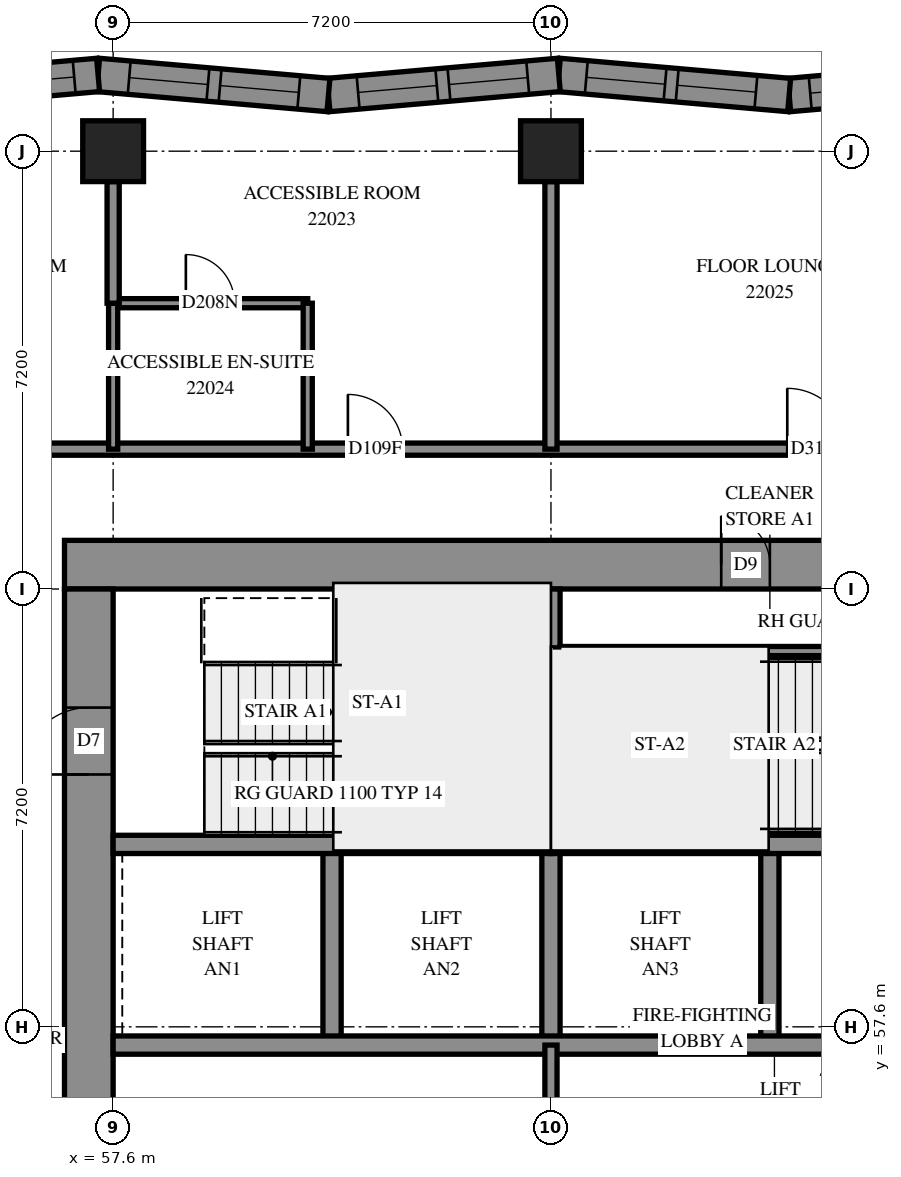
"""IFC4 building model, lengths in metres.
Left out: names, types, materials, properties, quantities, classifications, styles, units other than length and angle.
Written with IfcOpenShell. Run it as: python <this file> out.ifc"""

import sys

from ifc_helpers import new_model, si_unit, direction, frame, frame_2d, origin, origin_2d, place, context, subcontext, project, spatial, polyline, rectangle, outline, extrude, element, fill, save


model = new_model("IFC4")
c1 = context("Model", 3, precision=1e-05, world=origin(), true_north=direction((0.0, 1.0)))
c2 = subcontext(c1, "Body", "Model", "MODEL_VIEW")
j1 = project(units=[si_unit("LENGTHUNIT", "METRE"), si_unit("PLANEANGLEUNIT", "RADIAN")], contexts=[c1])
p1 = place(None, origin())
s1 = spatial("IfcSite", under=j1, at=p1, CompositionType="ELEMENT")
p2 = place(p1, origin())
s2 = spatial("IfcBuilding", under=s1, at=p2, CompositionType="ELEMENT")
p3 = place(p2, frame((0.0, 0.0, 84.6)))
s3 = spatial("IfcBuildingStorey", under=s2, at=p3, CompositionType="ELEMENT", Elevation=84.6)
for number, where, z_axis, x_axis in (
    (1, (57.6, 72.0, 0.0), (0.0, 0.0, 1.0), (1.0, 0.0, 0.0)),
    (2, (64.8, 72.0, 0.0), (0.0, 0.0, 1.0), (1.0, 0.0, 0.0)),
):
    element("IfcColumn", number, at=place(p3, frame(where, z_axis=z_axis, x_axis=x_axis)), inside=s3, PredefinedType="COLUMN", context=c2, shape_type="SweptSolid", body=[
        extrude(rectangle(XDim=1.0, YDim=1.0, at=origin_2d()), origin(), (0.0, 0.0, 1.0), 3.1),
    ])
p4 = place(p3, frame((56.8, 65.2, -0.3), z_axis=(0.0, 0.0, 1.0), x_axis=(1.0, 0.0, 0.0)))
e3 = element("IfcWall", 3, at=p4, inside=s3, PredefinedType="SHEAR", context=c2, shape_type="SweptSolid", body=[
    extrude(rectangle(XDim=16.0, YDim=0.8, at=frame_2d((8.0, 0.0))), origin(), (0.0, 0.0, 1.0), 2.7),
])
p5 = place(p4, frame((10.8, 0.0, 0.3)))
e4 = element("IfcOpeningElement", 4, at=p5, cuts=e3, PredefinedType="OPENING", context=c2, shape_type="SweptSolid", body=[
    extrude(rectangle(XDim=0.8, YDim=2.1, at=frame_2d((0.4, 1.05))), frame((0.0, 0.41, 0.0), z_axis=(0.0, -1.0, 0.0), x_axis=(1.0, 0.0, 0.0)), (0.0, 0.0, 1.0), 0.82),
])
p6 = place(p3, frame((57.2, 50.4, -0.3), z_axis=(0.0, 0.0, 1.0), x_axis=(0.0, 1.0, 0.0)))
e5 = element("IfcWall", 5, at=p6, inside=s3, PredefinedType="SHEAR", context=c2, shape_type="SweptSolid", body=[
    extrude(rectangle(XDim=14.4, YDim=0.8, at=frame_2d((7.2, 0.0))), origin(), (0.0, 0.0, 1.0), 2.7),
])
p7 = place(p6, frame((4.55, 0.0, 0.3)))
e6 = element("IfcOpeningElement", 6, at=p7, cuts=e5, PredefinedType="OPENING", context=c2, shape_type="SweptSolid", body=[
    extrude(rectangle(XDim=1.1, YDim=2.1, at=frame_2d((0.55, 1.05))), frame((0.0, 0.41, 0.0), z_axis=(0.0, -1.0, 0.0), x_axis=(1.0, 0.0, 0.0)), (0.0, 0.0, 1.0), 0.82),
])
p8 = place(p6, frame((11.35, 0.0, 0.3)))
e7 = element("IfcOpeningElement", 7, at=p8, cuts=e5, PredefinedType="OPENING", context=c2, shape_type="SweptSolid", body=[
    extrude(rectangle(XDim=1.1, YDim=2.1, at=frame_2d((0.55, 1.05))), frame((0.0, 0.41, 0.0), z_axis=(0.0, -1.0, 0.0), x_axis=(1.0, 0.0, 0.0)), (0.0, 0.0, 1.0), 0.82),
])
for number, where, z_axis, x_axis in (
    (8, (61.2, 57.3, 0.0), (0.0, 0.0, 1.0), (0.0, 1.0, 0.0)),
    (9, (64.8, 57.3, 0.0), (0.0, 0.0, 1.0), (0.0, 1.0, 0.0)),
    (10, (68.4, 57.3, 0.0), (0.0, 0.0, 1.0), (0.0, 1.0, 0.0)),
):
    element("IfcWall", number, at=place(p3, frame(where, z_axis=z_axis, x_axis=x_axis)), inside=s3, PredefinedType="SOLIDWALL", context=c2, shape_type="SweptSolid", body=[
        extrude(rectangle(XDim=3.3, YDim=0.3, at=frame_2d((1.65, 0.0))), origin(), (0.0, 0.0, 1.0), 3.1),
    ])
p9 = place(p3, frame((57.6, 57.3, 0.0), z_axis=(0.0, 0.0, 1.0), x_axis=(1.0, 0.0, 0.0)))
e11 = element("IfcWall", 11, at=p9, inside=s3, PredefinedType="SOLIDWALL", context=c2, shape_type="SweptSolid", body=[
    extrude(rectangle(XDim=14.4, YDim=0.3, at=frame_2d((7.2, 0.0))), origin(), (0.0, 0.0, 1.0), 3.1),
])
p10 = place(p9, frame((12.05, 0.0, 0.0)))
e12 = element("IfcOpeningElement", 12, at=p10, cuts=e11, PredefinedType="OPENING", context=c2, shape_type="SweptSolid", body=[
    extrude(rectangle(XDim=1.1, YDim=2.1, at=frame_2d((0.55, 1.05))), frame((0.0, 0.16, 0.0), z_axis=(0.0, -1.0, 0.0), x_axis=(1.0, 0.0, 0.0)), (0.0, 0.0, 1.0), 0.32),
])
for number, where, z_axis, x_axis in (
    (13, (57.6, 60.6, 0.0), (0.0, 0.0, 1.0), (1.0, 0.0, 0.0)),
    (14, (64.8, 60.6, 0.0), (0.0, 0.0, 1.0), (1.0, 0.0, 0.0)),
):
    element("IfcWall", number, at=place(p3, frame(where, z_axis=z_axis, x_axis=x_axis)), inside=s3, PredefinedType="SOLIDWALL", context=c2, shape_type="SweptSolid", body=[
        extrude(rectangle(XDim=7.2, YDim=0.3, at=frame_2d((3.6, 0.0))), origin(), (0.0, 0.0, 1.0), 3.1),
    ])
p11 = place(p3, frame((64.8, 60.6, 0.0), z_axis=(0.0, 0.0, 1.0), x_axis=(0.0, 1.0, 0.0)))
e15 = element("IfcWall", 15, at=p11, inside=s3, PredefinedType="SOLIDWALL", context=c2, shape_type="SweptSolid", body=[
    extrude(rectangle(XDim=4.2, YDim=0.3, at=frame_2d((2.1, 0.0))), origin(), (0.0, 0.0, 1.0), 3.1),
])
p12 = place(p3, frame((72.506, 73.254, 0.0), z_axis=(0.0, 0.0, 1.0), x_axis=(-0.9962273538, -0.0867816769, 0.0)))
e16 = element("IfcWall", 16, at=p12, inside=s3, PredefinedType="SOLIDWALL", context=c2, shape_type="SweptSolid", body=[
    extrude(outline(polyline([(-0.024, -0.275), (3.779, -0.275), (3.827, 0.275), (0.024, 0.275), (-0.024, -0.275)])), origin(), (0.0, 0.0, 1.0), 3.1),
])
p13 = place(p12, frame((0.655, 0.0, 0.5)))
e17 = element("IfcOpeningElement", 17, at=p13, cuts=e16, PredefinedType="OPENING", context=c2, shape_type="SweptSolid", body=[
    extrude(rectangle(XDim=1.3, YDim=2.45, at=frame_2d((0.65, 1.225))), frame((0.0, 0.285, 0.0), z_axis=(0.0, -1.0, 0.0), x_axis=(1.0, 0.0, 0.0)), (0.0, 0.0, 1.0), 0.57),
])
p14 = place(p12, frame((2.155, 0.0, 0.5)))
e18 = element("IfcOpeningElement", 18, at=p14, cuts=e16, PredefinedType="OPENING", context=c2, shape_type="SweptSolid", body=[
    extrude(rectangle(XDim=1.3, YDim=2.45, at=frame_2d((0.65, 1.225))), frame((0.0, 0.285, 0.0), z_axis=(0.0, -1.0, 0.0), x_axis=(1.0, 0.0, 0.0)), (0.0, 0.0, 1.0), 0.57),
])
p15 = place(p3, frame((68.718, 72.924, 0.0), z_axis=(0.0, 0.0, 1.0), x_axis=(-0.9962273538, 0.0867816769, 0.0)))
e19 = element("IfcWall", 19, at=p15, inside=s3, PredefinedType="SOLIDWALL", context=c2, shape_type="SweptSolid", body=[
    extrude(outline(polyline([(0.024, -0.275), (3.827, -0.275), (3.779, 0.275), (-0.024, 0.275), (0.024, -0.275)])), origin(), (0.0, 0.0, 1.0), 3.1),
])
p16 = place(p15, frame((0.549, 0.0, 0.5)))
e20 = element("IfcOpeningElement", 20, at=p16, cuts=e19, PredefinedType="OPENING", context=c2, shape_type="SweptSolid", body=[
    extrude(rectangle(XDim=1.3, YDim=2.45, at=frame_2d((0.65, 1.225))), frame((0.0, 0.285, 0.0), z_axis=(0.0, -1.0, 0.0), x_axis=(1.0, 0.0, 0.0)), (0.0, 0.0, 1.0), 0.57),
])
p17 = place(p15, frame((2.049, 0.0, 0.5)))
e21 = element("IfcOpeningElement", 21, at=p17, cuts=e19, PredefinedType="OPENING", context=c2, shape_type="SweptSolid", body=[
    extrude(rectangle(XDim=1.3, YDim=2.45, at=frame_2d((0.65, 1.225))), frame((0.0, 0.285, 0.0), z_axis=(0.0, -1.0, 0.0), x_axis=(1.0, 0.0, 0.0)), (0.0, 0.0, 1.0), 0.57),
])
p18 = place(p3, frame((64.929, 73.254, 0.0), z_axis=(0.0, 0.0, 1.0), x_axis=(-0.9962271558, -0.0867839505, 0.0)))
e22 = element("IfcWall", 22, at=p18, inside=s3, PredefinedType="SOLIDWALL", context=c2, shape_type="SweptSolid", body=[
    extrude(outline(polyline([(-0.024, -0.275), (3.779, -0.275), (3.827, 0.275), (0.024, 0.275), (-0.024, -0.275)])), origin(), (0.0, 0.0, 1.0), 3.1),
])
p19 = place(p18, frame((0.513, 0.0, 0.5)))
e23 = element("IfcOpeningElement", 23, at=p19, cuts=e22, PredefinedType="OPENING", context=c2, shape_type="SweptSolid", body=[
    extrude(rectangle(XDim=1.3, YDim=2.45, at=frame_2d((0.65, 1.225))), frame((0.0, 0.285, 0.0), z_axis=(0.0, -1.0, 0.0), x_axis=(1.0, 0.0, 0.0)), (0.0, 0.0, 1.0), 0.57),
])
p20 = place(p18, frame((2.013, 0.0, 0.5)))
e24 = element("IfcOpeningElement", 24, at=p20, cuts=e22, PredefinedType="OPENING", context=c2, shape_type="SweptSolid", body=[
    extrude(rectangle(XDim=1.3, YDim=2.45, at=frame_2d((0.65, 1.225))), frame((0.0, 0.285, 0.0), z_axis=(0.0, -1.0, 0.0), x_axis=(1.0, 0.0, 0.0)), (0.0, 0.0, 1.0), 0.57),
])
p21 = place(p3, frame((61.141, 72.924, 0.0), z_axis=(0.0, 0.0, 1.0), x_axis=(-0.9962273538, 0.0867816769, 0.0)))
e25 = element("IfcWall", 25, at=p21, inside=s3, PredefinedType="SOLIDWALL", context=c2, shape_type="SweptSolid", body=[
    extrude(outline(polyline([(0.024, -0.275), (3.827, -0.275), (3.779, 0.275), (-0.024, 0.275), (0.024, -0.275)])), origin(), (0.0, 0.0, 1.0), 3.1),
])
p22 = place(p21, frame((0.489, 0.0, 0.5)))
e26 = element("IfcOpeningElement", 26, at=p22, cuts=e25, PredefinedType="OPENING", context=c2, shape_type="SweptSolid", body=[
    extrude(rectangle(XDim=1.3, YDim=2.45, at=frame_2d((0.65, 1.225))), frame((0.0, 0.285, 0.0), z_axis=(0.0, -1.0, 0.0), x_axis=(1.0, 0.0, 0.0)), (0.0, 0.0, 1.0), 0.57),
])
p23 = place(p21, frame((1.989, 0.0, 0.5)))
e27 = element("IfcOpeningElement", 27, at=p23, cuts=e25, PredefinedType="OPENING", context=c2, shape_type="SweptSolid", body=[
    extrude(rectangle(XDim=1.3, YDim=2.45, at=frame_2d((0.65, 1.225))), frame((0.0, 0.285, 0.0), z_axis=(0.0, -1.0, 0.0), x_axis=(1.0, 0.0, 0.0)), (0.0, 0.0, 1.0), 0.57),
])
p24 = place(p3, frame((57.353, 73.254, 0.0), z_axis=(0.0, 0.0, 1.0), x_axis=(-0.9962273538, -0.0867816769, 0.0)))
e28 = element("IfcWall", 28, at=p24, inside=s3, PredefinedType="SOLIDWALL", context=c2, shape_type="SweptSolid", body=[
    extrude(outline(polyline([(-0.024, -0.275), (3.779, -0.275), (3.827, 0.275), (0.024, 0.275), (-0.024, -0.275)])), origin(), (0.0, 0.0, 1.0), 3.1),
])
p25 = place(p24, frame((0.395, 0.0, 0.5)))
e29 = element("IfcOpeningElement", 29, at=p25, cuts=e28, PredefinedType="OPENING", context=c2, shape_type="SweptSolid", body=[
    extrude(rectangle(XDim=1.3, YDim=2.45, at=frame_2d((0.65, 1.225))), frame((0.0, 0.285, 0.0), z_axis=(0.0, -1.0, 0.0), x_axis=(1.0, 0.0, 0.0)), (0.0, 0.0, 1.0), 0.57),
])
p26 = place(p24, frame((1.895, 0.0, 0.5)))
e30 = element("IfcOpeningElement", 30, at=p26, cuts=e28, PredefinedType="OPENING", context=c2, shape_type="SweptSolid", body=[
    extrude(rectangle(XDim=1.3, YDim=2.45, at=frame_2d((0.65, 1.225))), frame((0.0, 0.285, 0.0), z_axis=(0.0, -1.0, 0.0), x_axis=(1.0, 0.0, 0.0)), (0.0, 0.0, 1.0), 0.57),
])
p27 = place(p3, frame((64.95, 63.78, 0.0), z_axis=(0.0, 0.0, 1.0), x_axis=(1.0, 0.0, 0.0)))
e31 = element("IfcWall", 31, at=p27, inside=s3, PredefinedType="PARTITIONING", context=c2, shape_type="SweptSolid", body=[
    extrude(rectangle(XDim=6.9, YDim=0.15, at=frame_2d((3.45, 0.0))), origin(), (0.0, 0.0, 1.0), 3.1),
])
p28 = place(p3, frame((64.8, 53.7, 0.0), z_axis=(0.0, 0.0, 1.0), x_axis=(0.0, 1.0, 0.0)))
e32 = element("IfcWall", 32, at=p28, inside=s3, PredefinedType="PARTITIONING", context=c2, shape_type="SweptSolid", body=[
    extrude(rectangle(XDim=3.6, YDim=0.2, at=frame_2d((1.8, 0.0))), origin(), (0.0, 0.0, 1.0), 3.1),
])
p29 = place(p3, frame((55.3, 67.1, 0.0), z_axis=(0.0, 0.0, 1.0), x_axis=(1.0, 0.0, 0.0)))
e33 = element("IfcWall", 33, at=p29, inside=s3, PredefinedType="PARTITIONING", context=c2, shape_type="SweptSolid", body=[
    extrude(rectangle(XDim=19.0, YDim=0.2, at=frame_2d((9.5, 0.0))), origin(), (0.0, 0.0, 1.0), 3.1),
])
p30 = place(p29, frame((6.161, 0.0, 0.0)))
e34 = element("IfcOpeningElement", 34, at=p30, cuts=e33, PredefinedType="OPENING", context=c2, shape_type="SweptSolid", body=[
    extrude(rectangle(XDim=0.9, YDim=2.1, at=frame_2d((0.45, 1.05))), frame((0.0, 0.11, 0.0), z_axis=(0.0, -1.0, 0.0), x_axis=(1.0, 0.0, 0.0)), (0.0, 0.0, 1.0), 0.22),
])
p31 = place(p29, frame((13.386, 0.0, 0.0)))
e35 = element("IfcOpeningElement", 35, at=p31, cuts=e33, PredefinedType="OPENING", context=c2, shape_type="SweptSolid", body=[
    extrude(rectangle(XDim=1.0, YDim=2.1, at=frame_2d((0.5, 1.05))), frame((0.0, 0.11, 0.0), z_axis=(0.0, -1.0, 0.0), x_axis=(1.0, 0.0, 0.0)), (0.0, 0.0, 1.0), 0.22),
])
p32 = place(p3, frame((64.8, 67.1, 0.0), z_axis=(0.0, 0.0, 1.0), x_axis=(0.0, 1.0, 0.0)))
e36 = element("IfcWall", 36, at=p32, inside=s3, PredefinedType="PARTITIONING", context=c2, shape_type="SweptSolid", body=[
    extrude(rectangle(XDim=4.4, YDim=0.2, at=frame_2d((2.2, 0.0))), origin(), (0.0, 0.0, 1.0), 3.1),
])
p33 = place(p3, frame((57.6, 69.5, 0.0), z_axis=(0.0, 0.0, 1.0), x_axis=(1.0, 0.0, 0.0)))
e37 = element("IfcWall", 37, at=p33, inside=s3, PredefinedType="PARTITIONING", context=c2, shape_type="SweptSolid", body=[
    extrude(rectangle(XDim=3.2, YDim=0.15, at=frame_2d((1.6, 0.0))), origin(), (0.0, 0.0, 1.0), 3.1),
])
p34 = place(p33, frame((1.196, 0.0, 0.0)))
e38 = element("IfcOpeningElement", 38, at=p34, cuts=e37, PredefinedType="OPENING", context=c2, shape_type="SweptSolid", body=[
    extrude(rectangle(XDim=0.8, YDim=2.1, at=frame_2d((0.4, 1.05))), frame((0.0, 0.085, 0.0), z_axis=(0.0, -1.0, 0.0), x_axis=(1.0, 0.0, 0.0)), (0.0, 0.0, 1.0), 0.17),
])
for number, where, z_axis, x_axis in (
    (39, (57.6, 67.1, 0.0), (0.0, 0.0, 1.0), (0.0, 1.0, 0.0)),
    (40, (60.8, 67.1, 0.0), (0.0, 0.0, 1.0), (0.0, 1.0, 0.0)),
):
    element("IfcWall", number, at=place(p3, frame(where, z_axis=z_axis, x_axis=x_axis)), inside=s3, PredefinedType="PARTITIONING", context=c2, shape_type="SweptSolid", body=[
        extrude(rectangle(XDim=2.4, YDim=0.15, at=frame_2d((1.2, 0.0))), origin(), (0.0, 0.0, 1.0), 3.1),
    ])
p35 = place(p3, frame((57.6, 69.5, 0.0), z_axis=(0.0, 0.0, 1.0), x_axis=(0.0, 1.0, 0.0)))
e41 = element("IfcWall", 41, at=p35, inside=s3, PredefinedType="PARTITIONING", context=c2, shape_type="SweptSolid", body=[
    extrude(rectangle(XDim=2.0, YDim=0.2, at=frame_2d((1.0, 0.0))), origin(), (0.0, 0.0, 1.0), 3.1),
])
p36 = place(p14, origin())
e42 = element("IfcWindow", 42, at=p36, inside=s3, PartitioningType="SINGLE_PANEL", PredefinedType="WINDOW", context=c2, shape_type="SweptSolid", body=[
    extrude(rectangle(XDim=1.3, YDim=2.45, at=frame_2d((0.65, 1.225))), frame((0.0, 0.155, 0.0), z_axis=(0.0, -1.0, 0.0), x_axis=(1.0, 0.0, 0.0)), (0.0, 0.0, 1.0), 0.06),
])
fill(e18, e42)
p37 = place(p16, origin())
e43 = element("IfcWindow", 43, at=p37, inside=s3, PartitioningType="SINGLE_PANEL", PredefinedType="WINDOW", context=c2, shape_type="SweptSolid", body=[
    extrude(rectangle(XDim=1.3, YDim=2.45, at=frame_2d((0.65, 1.225))), frame((0.0, 0.155, 0.0), z_axis=(0.0, -1.0, 0.0), x_axis=(1.0, 0.0, 0.0)), (0.0, 0.0, 1.0), 0.06),
])
fill(e20, e43)
p38 = place(p17, origin())
e44 = element("IfcWindow", 44, at=p38, inside=s3, PartitioningType="SINGLE_PANEL", PredefinedType="WINDOW", context=c2, shape_type="SweptSolid", body=[
    extrude(rectangle(XDim=1.3, YDim=2.45, at=frame_2d((0.65, 1.225))), frame((0.0, 0.155, 0.0), z_axis=(0.0, -1.0, 0.0), x_axis=(1.0, 0.0, 0.0)), (0.0, 0.0, 1.0), 0.06),
])
fill(e21, e44)
p39 = place(p19, origin())
e45 = element("IfcWindow", 45, at=p39, inside=s3, PartitioningType="SINGLE_PANEL", PredefinedType="WINDOW", context=c2, shape_type="SweptSolid", body=[
    extrude(rectangle(XDim=1.3, YDim=2.45, at=frame_2d((0.65, 1.225))), frame((0.0, 0.155, 0.0), z_axis=(0.0, -1.0, 0.0), x_axis=(1.0, 0.0, 0.0)), (0.0, 0.0, 1.0), 0.06),
])
fill(e23, e45)
p40 = place(p20, origin())
e46 = element("IfcWindow", 46, at=p40, inside=s3, PartitioningType="SINGLE_PANEL", PredefinedType="WINDOW", context=c2, shape_type="SweptSolid", body=[
    extrude(rectangle(XDim=1.3, YDim=2.45, at=frame_2d((0.65, 1.225))), frame((0.0, 0.155, 0.0), z_axis=(0.0, -1.0, 0.0), x_axis=(1.0, 0.0, 0.0)), (0.0, 0.0, 1.0), 0.06),
])
fill(e24, e46)
p41 = place(p22, origin())
e47 = element("IfcWindow", 47, at=p41, inside=s3, PartitioningType="SINGLE_PANEL", PredefinedType="WINDOW", context=c2, shape_type="SweptSolid", body=[
    extrude(rectangle(XDim=1.3, YDim=2.45, at=frame_2d((0.65, 1.225))), frame((0.0, 0.155, 0.0), z_axis=(0.0, -1.0, 0.0), x_axis=(1.0, 0.0, 0.0)), (0.0, 0.0, 1.0), 0.06),
])
fill(e26, e47)
p42 = place(p23, origin())
e48 = element("IfcWindow", 48, at=p42, inside=s3, PartitioningType="SINGLE_PANEL", PredefinedType="WINDOW", context=c2, shape_type="SweptSolid", body=[
    extrude(rectangle(XDim=1.3, YDim=2.45, at=frame_2d((0.65, 1.225))), frame((0.0, 0.155, 0.0), z_axis=(0.0, -1.0, 0.0), x_axis=(1.0, 0.0, 0.0)), (0.0, 0.0, 1.0), 0.06),
])
fill(e27, e48)
p43 = place(p25, origin())
e49 = element("IfcWindow", 49, at=p43, inside=s3, PartitioningType="SINGLE_PANEL", PredefinedType="WINDOW", context=c2, shape_type="SweptSolid", body=[
    extrude(rectangle(XDim=1.3, YDim=2.45, at=frame_2d((0.65, 1.225))), frame((0.0, 0.155, 0.0), z_axis=(0.0, -1.0, 0.0), x_axis=(1.0, 0.0, 0.0)), (0.0, 0.0, 1.0), 0.06),
])
fill(e29, e49)
p44 = place(p5, origin())
e50 = element("IfcDoor", 50, at=p44, inside=s3, OperationType="SINGLE_SWING_RIGHT", PredefinedType="DOOR", context=c2, shape_type="SweptSolid", body=[
    extrude(rectangle(XDim=0.8, YDim=2.1, at=frame_2d((0.4, 1.05))), frame((0.0, -0.34, 0.0), z_axis=(0.0, -1.0, 0.0), x_axis=(1.0, 0.0, 0.0)), (0.0, 0.0, 1.0), 0.05),
])
fill(e4, e50)
p45 = place(p8, origin())
e51 = element("IfcDoor", 51, at=p45, inside=s3, OperationType="SINGLE_SWING_LEFT", PredefinedType="DOOR", context=c2, shape_type="SweptSolid", body=[
    extrude(rectangle(XDim=1.1, YDim=2.1, at=frame_2d((0.55, 1.05))), frame((0.0, 0.025, 0.0), z_axis=(0.0, -1.0, 0.0), x_axis=(1.0, 0.0, 0.0)), (0.0, 0.0, 1.0), 0.05),
])
fill(e7, e51)
p46 = place(p30, origin())
e52 = element("IfcDoor", 52, at=p46, inside=s3, OperationType="SINGLE_SWING_RIGHT", PredefinedType="DOOR", context=c2, shape_type="SweptSolid", body=[
    extrude(rectangle(XDim=0.9, YDim=2.1, at=frame_2d((0.45, 1.05))), frame((0.0, 0.025, 0.0), z_axis=(0.0, -1.0, 0.0), x_axis=(1.0, 0.0, 0.0)), (0.0, 0.0, 1.0), 0.05),
])
fill(e34, e52)
p47 = place(p34, origin())
e53 = element("IfcDoor", 53, at=p47, inside=s3, OperationType="SINGLE_SWING_RIGHT", PredefinedType="DOOR", context=c2, shape_type="SweptSolid", body=[
    extrude(rectangle(XDim=0.8, YDim=2.1, at=frame_2d((0.4, 1.05))), frame((0.0, 0.025, 0.0), z_axis=(0.0, -1.0, 0.0), x_axis=(1.0, 0.0, 0.0)), (0.0, 0.0, 1.0), 0.05),
])
fill(e38, e53)
p48 = place(p31, origin())
e54 = element("IfcDoor", 54, at=p48, inside=s3, OperationType="SINGLE_SWING_RIGHT", PredefinedType="DOOR", context=c2, shape_type="SweptSolid", body=[
    extrude(rectangle(XDim=1.0, YDim=2.1, at=frame_2d((0.5, 1.05))), frame((0.0, 0.025, 0.0), z_axis=(0.0, -1.0, 0.0), x_axis=(1.0, 0.0, 0.0)), (0.0, 0.0, 1.0), 0.05),
])
fill(e35, e54)
save(model, sys.argv[1])
